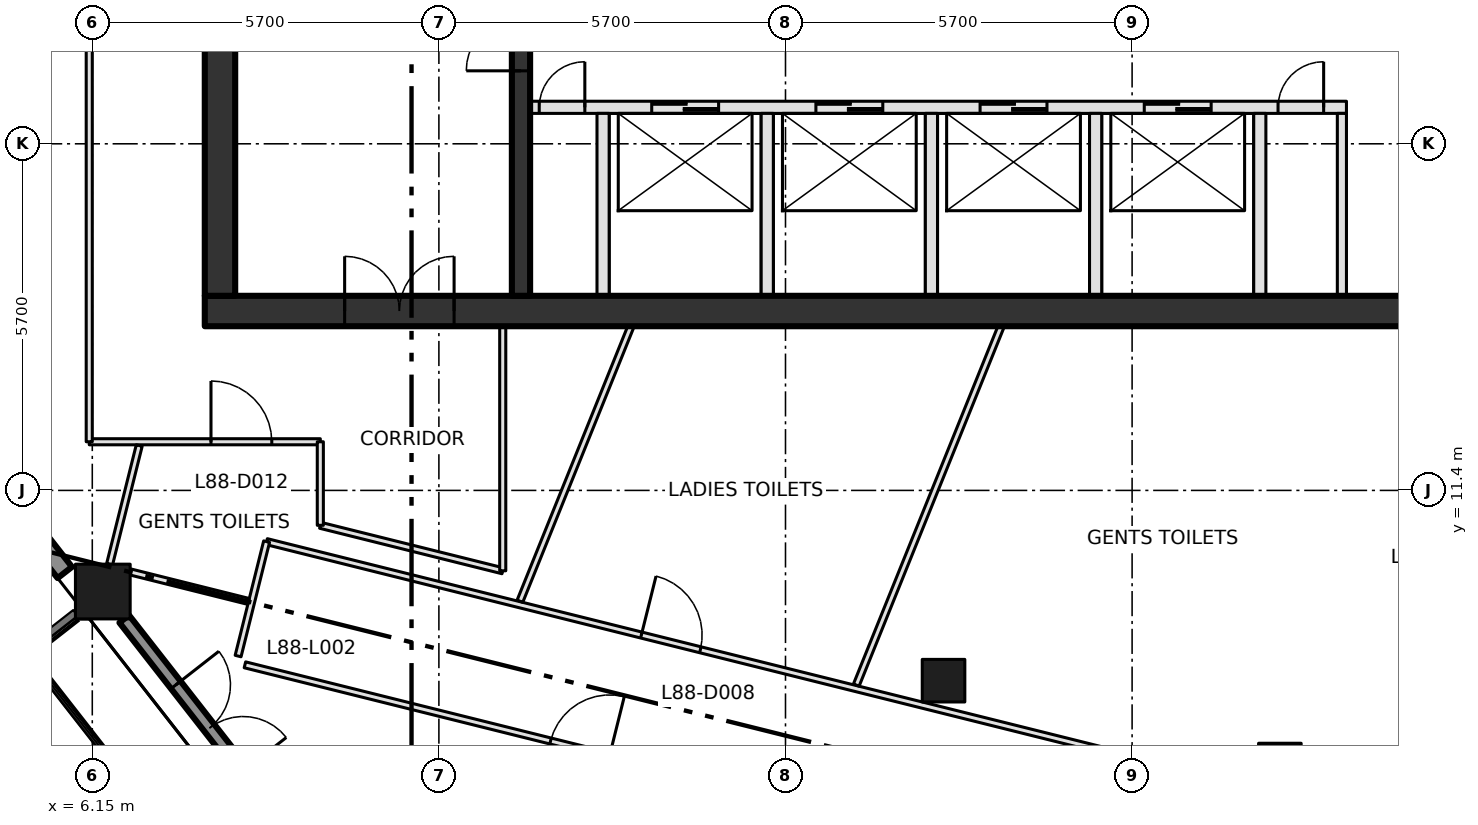
"""IFC4 building model, lengths in metres.
Left out: names, types, materials, properties, quantities, classifications, styles, units other than length and angle.
Written with IfcOpenShell. Run it as: python <this file> out.ifc"""

import sys

from ifc_helpers import new_model, si_unit, direction, frame, frame_2d, origin, origin_2d, place, context, subcontext, project, spatial, rectangle, extrude, element, fill, save


model = new_model("IFC4")
c1 = context("Model", 3, precision=1e-05, world=origin(), true_north=direction((0.0, 1.0)))
c2 = subcontext(c1, "Body", "Model", "MODEL_VIEW")
j1 = project(units=[si_unit("LENGTHUNIT", "METRE"), si_unit("PLANEANGLEUNIT", "RADIAN")], contexts=[c1])
p1 = place(None, origin())
s1 = spatial("IfcSite", under=j1, at=p1, CompositionType="ELEMENT")
p2 = place(p1, origin())
s2 = spatial("IfcBuilding", under=s1, at=p2, CompositionType="ELEMENT")
p3 = place(p2, frame((0.0, 0.0, 383.4)))
s3 = spatial("IfcBuildingStorey", under=s2, at=p3, CompositionType="ELEMENT", Elevation=383.4)
p4 = place(p3, frame((6.323, 9.737, 0.0), z_axis=(0.0, 0.0, 1.0), x_axis=(1.0, 0.0, 0.0)))
e1 = element("IfcColumn", 1, at=p4, inside=s3, PredefinedType="COLUMN", context=c2, shape_type="SweptSolid", body=[
    extrude(rectangle(XDim=0.9, YDim=0.9, at=origin_2d()), origin(), (0.0, 0.0, 1.0), 4.2),
])
for number, where, z_axis, x_axis in (
    (2, (20.149, 8.271, 0.0), (0.0, 0.0, 1.0), (1.0, 0.0, 0.0)),
    (3, (25.68, 6.892, 0.0), (0.0, 0.0, 1.0), (1.0, 0.0, 0.0)),
):
    element("IfcColumn", number, at=place(p3, frame(where, z_axis=z_axis, x_axis=x_axis)), inside=s3, PredefinedType="COLUMN", context=c2, shape_type="SweptSolid", body=[
        extrude(rectangle(XDim=0.7, YDim=0.7, at=origin_2d()), origin(), (0.0, 0.0, 1.0), 4.2),
    ])
p5 = place(p3, frame((8.0, 14.35, -0.3), z_axis=(0.0, 0.0, 1.0), x_axis=(1.0, 0.0, 0.0)))
e4 = element("IfcWall", 4, at=p5, inside=s3, PredefinedType="SHEAR", context=c2, shape_type="SweptSolid", body=[
    extrude(rectangle(XDim=22.8, YDim=0.5, at=frame_2d((11.4, 0.0))), origin(), (0.0, 0.0, 1.0), 4.2),
])
p6 = place(p5, frame((2.3, 0.0, 0.3)))
e5 = element("IfcOpeningElement", 5, at=p6, cuts=e4, PredefinedType="OPENING", context=c2, shape_type="SweptSolid", body=[
    extrude(rectangle(XDim=1.8, YDim=2.1, at=frame_2d((0.9, 1.05))), frame((0.0, 0.26, 0.0), z_axis=(0.0, -1.0, 0.0), x_axis=(1.0, 0.0, 0.0)), (0.0, 0.0, 1.0), 0.52),
])
p7 = place(p3, frame((8.25, 14.6, -0.3), z_axis=(0.0, 0.0, 1.0), x_axis=(0.0, 1.0, 0.0)))
e6 = element("IfcWall", 6, at=p7, inside=s3, PredefinedType="SHEAR", context=c2, shape_type="SweptSolid", body=[
    extrude(rectangle(XDim=21.1, YDim=0.5, at=frame_2d((10.55, 0.0))), origin(), (0.0, 0.0, 1.0), 4.2),
])
p8 = place(p3, frame((13.35, 17.7, 0.0), z_axis=(0.0, 0.0, 1.0), x_axis=(1.0, 0.0, 0.0)))
e7 = element("IfcWall", 7, at=p8, inside=s3, PredefinedType="SOLIDWALL", context=c2, shape_type="SweptSolid", body=[
    extrude(rectangle(XDim=13.425, YDim=0.2, at=frame_2d((6.712, 0.0))), origin(), (0.0, 0.0, 1.0), 3.9),
])
p9 = place(p8, frame((2.0, 0.0, 0.0)))
e8 = element("IfcOpeningElement", 8, at=p9, cuts=e7, PredefinedType="OPENING", context=c2, shape_type="SweptSolid", body=[
    extrude(rectangle(XDim=1.1, YDim=2.1, at=frame_2d((0.55, 1.05))), frame((0.0, 0.11, 0.0), z_axis=(0.0, -1.0, 0.0), x_axis=(1.0, 0.0, 0.0)), (0.0, 0.0, 1.0), 0.22),
])
p10 = place(p8, frame((4.7, 0.0, 0.0)))
e9 = element("IfcOpeningElement", 9, at=p10, cuts=e7, PredefinedType="OPENING", context=c2, shape_type="SweptSolid", body=[
    extrude(rectangle(XDim=1.1, YDim=2.1, at=frame_2d((0.55, 1.05))), frame((0.0, 0.11, 0.0), z_axis=(0.0, -1.0, 0.0), x_axis=(1.0, 0.0, 0.0)), (0.0, 0.0, 1.0), 0.22),
])
p11 = place(p8, frame((7.4, 0.0, 0.0)))
e10 = element("IfcOpeningElement", 10, at=p11, cuts=e7, PredefinedType="OPENING", context=c2, shape_type="SweptSolid", body=[
    extrude(rectangle(XDim=1.1, YDim=2.1, at=frame_2d((0.55, 1.05))), frame((0.0, 0.11, 0.0), z_axis=(0.0, -1.0, 0.0), x_axis=(1.0, 0.0, 0.0)), (0.0, 0.0, 1.0), 0.22),
])
p12 = place(p8, frame((10.1, 0.0, 0.0)))
e11 = element("IfcOpeningElement", 11, at=p12, cuts=e7, PredefinedType="OPENING", context=c2, shape_type="SweptSolid", body=[
    extrude(rectangle(XDim=1.1, YDim=2.1, at=frame_2d((0.55, 1.05))), frame((0.0, 0.11, 0.0), z_axis=(0.0, -1.0, 0.0), x_axis=(1.0, 0.0, 0.0)), (0.0, 0.0, 1.0), 0.22),
])
p13 = place(p8, frame((0.15, 0.0, 0.0)))
e12 = element("IfcOpeningElement", 12, at=p13, cuts=e7, PredefinedType="OPENING", context=c2, shape_type="SweptSolid", body=[
    extrude(rectangle(XDim=0.75, YDim=2.1, at=frame_2d((0.375, 1.05))), frame((0.0, 0.11, 0.0), z_axis=(0.0, -1.0, 0.0), x_axis=(1.0, 0.0, 0.0)), (0.0, 0.0, 1.0), 0.22),
])
p14 = place(p8, frame((12.3, 0.0, 0.0)))
e13 = element("IfcOpeningElement", 13, at=p14, cuts=e7, PredefinedType="OPENING", context=c2, shape_type="SweptSolid", body=[
    extrude(rectangle(XDim=0.75, YDim=2.1, at=frame_2d((0.375, 1.05))), frame((0.0, 0.11, 0.0), z_axis=(0.0, -1.0, 0.0), x_axis=(1.0, 0.0, 0.0)), (0.0, 0.0, 1.0), 0.22),
])
p15 = place(p3, frame((13.2, 14.6, 0.0), z_axis=(0.0, 0.0, 1.0), x_axis=(0.0, 1.0, 0.0)))
e14 = element("IfcWall", 14, at=p15, inside=s3, PredefinedType="SHEAR", context=c2, shape_type="SweptSolid", body=[
    extrude(rectangle(XDim=21.1, YDim=0.3, at=frame_2d((10.55, 0.0))), origin(), (0.0, 0.0, 1.0), 3.9),
])
p16 = place(p15, frame((3.7, 0.0, 0.0)))
e15 = element("IfcOpeningElement", 15, at=p16, cuts=e14, PredefinedType="OPENING", context=c2, shape_type="SweptSolid", body=[
    extrude(rectangle(XDim=1.8, YDim=2.1, at=frame_2d((0.9, 1.05))), frame((0.0, 0.16, 0.0), z_axis=(0.0, -1.0, 0.0), x_axis=(1.0, 0.0, 0.0)), (0.0, 0.0, 1.0), 0.32),
])
p17 = place(p15, frame((11.8, 0.0, 0.0)))
e16 = element("IfcOpeningElement", 16, at=p17, cuts=e14, PredefinedType="OPENING", context=c2, shape_type="SweptSolid", body=[
    extrude(rectangle(XDim=1.2, YDim=2.1, at=frame_2d((0.6, 1.05))), frame((0.0, 0.16, 0.0), z_axis=(0.0, -1.0, 0.0), x_axis=(1.0, 0.0, 0.0)), (0.0, 0.0, 1.0), 0.32),
])
for number, where, z_axis, x_axis in (
    (17, (14.55, 14.6, 0.0), (0.0, 0.0, 1.0), (0.0, 1.0, 0.0)),
    (18, (17.25, 14.6, 0.0), (0.0, 0.0, 1.0), (0.0, 1.0, 0.0)),
    (19, (19.95, 14.6, 0.0), (0.0, 0.0, 1.0), (0.0, 1.0, 0.0)),
    (20, (22.65, 14.6, 0.0), (0.0, 0.0, 1.0), (0.0, 1.0, 0.0)),
    (21, (25.35, 14.6, 0.0), (0.0, 0.0, 1.0), (0.0, 1.0, 0.0)),
):
    element("IfcWall", number, at=place(p3, frame(where, z_axis=z_axis, x_axis=x_axis)), inside=s3, PredefinedType="SOLIDWALL", context=c2, shape_type="SweptSolid", body=[
        extrude(rectangle(XDim=3.0, YDim=0.2, at=frame_2d((1.5, 0.0))), origin(), (0.0, 0.0, 1.0), 3.9),
    ])
p18 = place(p3, frame((26.7, 14.6, 0.0), z_axis=(0.0, 0.0, 1.0), x_axis=(0.0, 1.0, 0.0)))
e22 = element("IfcWall", 22, at=p18, inside=s3, PredefinedType="PARTITIONING", context=c2, shape_type="SweptSolid", body=[
    extrude(rectangle(XDim=3.0, YDim=0.15, at=frame_2d((1.5, 0.0))), origin(), (0.0, 0.0, 1.0), 3.9),
])
p19 = place(p3, frame((2.967, 13.547, 0.0), z_axis=(0.0, 0.0, 1.0), x_axis=(0.615486001463, -0.788147817356, 0.0)))
e23 = element("IfcWall", 23, at=p19, inside=s3, PredefinedType="SOLIDWALL", context=c2, shape_type="SweptSolid", body=[
    extrude(rectangle(XDim=4.437, YDim=0.3, at=frame_2d((2.219, 0.0))), origin(), (0.0, 0.0, 1.0), 3.2),
])
p20 = place(p19, frame((1.018, 0.0, 0.8)))
e24 = element("IfcOpeningElement", 24, at=p20, cuts=e23, PredefinedType="OPENING", context=c2, shape_type="SweptSolid", body=[
    extrude(rectangle(XDim=2.4, YDim=2.1, at=frame_2d((1.2, 1.05))), frame((0.0, 0.16, 0.0), z_axis=(0.0, -1.0, 0.0), x_axis=(1.0, 0.0, 0.0)), (0.0, 0.0, 1.0), 0.32),
])
p21 = place(p3, frame((6.675, 9.287, 0.0), z_axis=(0.0, 0.0, 1.0), x_axis=(0.615593109271, -0.788064162247, 0.0)))
e25 = element("IfcWall", 25, at=p21, inside=s3, PredefinedType="SOLIDWALL", context=c2, shape_type="SweptSolid", body=[
    extrude(rectangle(XDim=4.558, YDim=0.2, at=frame_2d((2.279, 0.0))), origin(), (0.0, 0.0, 1.0), 3.2),
])
p22 = place(p21, frame((1.378, 0.0, 0.0)))
e26 = element("IfcOpeningElement", 26, at=p22, cuts=e25, PredefinedType="OPENING", context=c2, shape_type="SweptSolid", body=[
    extrude(rectangle(XDim=1.8, YDim=2.9, at=frame_2d((0.9, 1.45))), frame((0.0, 0.11, 0.0), z_axis=(0.0, -1.0, 0.0), x_axis=(1.0, 0.0, 0.0)), (0.0, 0.0, 1.0), 0.22),
])
p23 = place(p3, frame((6.1, 12.2, 0.0), z_axis=(0.0, 0.0, 1.0), x_axis=(1.0, 0.0, 0.0)))
e27 = element("IfcWall", 27, at=p23, inside=s3, PredefinedType="PARTITIONING", context=c2, shape_type="SweptSolid", body=[
    extrude(rectangle(XDim=3.8, YDim=0.1, at=frame_2d((1.9, 0.0))), origin(), (0.0, 0.0, 1.0), 3.9),
])
p24 = place(p23, frame((2.002, 0.0, 0.0)))
e28 = element("IfcOpeningElement", 28, at=p24, cuts=e27, PredefinedType="OPENING", context=c2, shape_type="SweptSolid", body=[
    extrude(rectangle(XDim=1.0, YDim=2.1, at=frame_2d((0.5, 1.05))), frame((0.0, 0.06, 0.0), z_axis=(0.0, -1.0, 0.0), x_axis=(1.0, 0.0, 0.0)), (0.0, 0.0, 1.0), 0.12),
])
p25 = place(p3, frame((6.1, 29.287, 0.0), z_axis=(0.0, 0.0, 1.0), x_axis=(0.0, -1.0, 0.0)))
e29 = element("IfcWall", 29, at=p25, inside=s3, PredefinedType="PARTITIONING", context=c2, shape_type="SweptSolid", body=[
    extrude(rectangle(XDim=17.087, YDim=0.1, at=frame_2d((8.543, 0.0))), origin(), (0.0, 0.0, 1.0), 3.9),
])
p26 = place(p25, frame((7.98, 0.0, 0.0)))
e30 = element("IfcOpeningElement", 30, at=p26, cuts=e29, PredefinedType="OPENING", context=c2, shape_type="SweptSolid", body=[
    extrude(rectangle(XDim=1.8, YDim=2.1, at=frame_2d((0.9, 1.05))), frame((0.0, 0.06, 0.0), z_axis=(0.0, -1.0, 0.0), x_axis=(1.0, 0.0, 0.0)), (0.0, 0.0, 1.0), 0.12),
])
p27 = place(p3, frame((8.66, 8.532, 0.0), z_axis=(0.0, 0.0, 1.0), x_axis=(0.970305360263, -0.241883252509, 0.0)))
e31 = element("IfcWall", 31, at=p27, inside=s3, PredefinedType="PARTITIONING", context=c2, shape_type="SweptSolid", body=[
    extrude(rectangle(XDim=28.356, YDim=0.1, at=frame_2d((14.178, 0.0))), origin(), (0.0, 0.0, 1.0), 3.9),
])
p28 = place(p27, frame((18.321, 0.0, 0.0)))
e32 = element("IfcOpeningElement", 32, at=p28, cuts=e31, PredefinedType="OPENING", context=c2, shape_type="SweptSolid", body=[
    extrude(rectangle(XDim=1.8, YDim=2.1, at=frame_2d((0.9, 1.05))), frame((0.0, 0.06, 0.0), z_axis=(0.0, -1.0, 0.0), x_axis=(1.0, 0.0, 0.0)), (0.0, 0.0, 1.0), 0.12),
])
p29 = place(p27, frame((25.22, 0.0, 0.0)))
e33 = element("IfcOpeningElement", 33, at=p29, cuts=e31, PredefinedType="OPENING", context=c2, shape_type="SweptSolid", body=[
    extrude(rectangle(XDim=1.0, YDim=2.1, at=frame_2d((0.5, 1.05))), frame((0.0, 0.06, 0.0), z_axis=(0.0, -1.0, 0.0), x_axis=(1.0, 0.0, 0.0)), (0.0, 0.0, 1.0), 0.12),
])
p30 = place(p27, frame((5.18, 0.0, 0.0)))
e34 = element("IfcOpeningElement", 34, at=p30, cuts=e31, PredefinedType="OPENING", context=c2, shape_type="SweptSolid", body=[
    extrude(rectangle(XDim=1.0, YDim=2.1, at=frame_2d((0.5, 1.05))), frame((0.0, 0.06, 0.0), z_axis=(0.0, -1.0, 0.0), x_axis=(1.0, 0.0, 0.0)), (0.0, 0.0, 1.0), 0.12),
])
p31 = place(p3, frame((9.017, 10.558, 0.0), z_axis=(0.0, 0.0, 1.0), x_axis=(0.970286089829, -0.241960542, 0.0)))
e35 = element("IfcWall", 35, at=p31, inside=s3, PredefinedType="PARTITIONING", context=c2, shape_type="SweptSolid", body=[
    extrude(rectangle(XDim=19.879, YDim=0.1, at=frame_2d((9.94, 0.0))), origin(), (0.0, 0.0, 1.0), 3.9),
])
p32 = place(p31, frame((6.351, 0.0, 0.0)))
e36 = element("IfcOpeningElement", 36, at=p32, cuts=e35, PredefinedType="OPENING", context=c2, shape_type="SweptSolid", body=[
    extrude(rectangle(XDim=1.0, YDim=2.1, at=frame_2d((0.5, 1.05))), frame((0.0, 0.06, 0.0), z_axis=(0.0, -1.0, 0.0), x_axis=(1.0, 0.0, 0.0)), (0.0, 0.0, 1.0), 0.12),
])
p33 = place(p3, frame((9.017, 10.558, 0.0), z_axis=(0.0, 0.0, 1.0), x_axis=(-0.241795146079, -0.970327319688, 0.0)))
e37 = element("IfcWall", 37, at=p33, inside=s3, PredefinedType="PARTITIONING", context=c2, shape_type="SweptSolid", body=[
    extrude(rectangle(XDim=1.94, YDim=0.1, at=frame_2d((0.97, 0.0))), origin(), (0.0, 0.0, 1.0), 3.9),
])
p34 = place(p3, frame((9.9, 10.826, 0.0), z_axis=(0.0, 0.0, 1.0), x_axis=(0.970290953223, -0.241941038466, 0.0)))
e38 = element("IfcWall", 38, at=p34, inside=s3, PredefinedType="PARTITIONING", context=c2, shape_type="SweptSolid", body=[
    extrude(rectangle(XDim=3.092, YDim=0.1, at=frame_2d((1.546, 0.0))), origin(), (0.0, 0.0, 1.0), 3.9),
])
p35 = place(p3, frame((9.9, 12.2, 0.0), z_axis=(0.0, 0.0, 1.0), x_axis=(0.0, -1.0, 0.0)))
e39 = element("IfcWall", 39, at=p35, inside=s3, PredefinedType="PARTITIONING", context=c2, shape_type="SweptSolid", body=[
    extrude(rectangle(XDim=1.374, YDim=0.1, at=frame_2d((0.687, 0.0))), origin(), (0.0, 0.0, 1.0), 3.9),
])
p36 = place(p3, frame((12.9, 10.078, 0.0), z_axis=(0.0, 0.0, 1.0), x_axis=(0.0, 1.0, 0.0)))
e40 = element("IfcWall", 40, at=p36, inside=s3, PredefinedType="PARTITIONING", context=c2, shape_type="SweptSolid", body=[
    extrude(rectangle(XDim=4.022, YDim=0.1, at=frame_2d((2.011, 0.0))), origin(), (0.0, 0.0, 1.0), 3.9),
])
p37 = place(p3, frame((6.922, 12.138, 0.0), z_axis=(0.0, 0.0, 1.0), x_axis=(-0.24222136375, -0.97022101139, 0.0)))
e41 = element("IfcWall", 41, at=p37, inside=s3, PredefinedType="PARTITIONING", context=c2, shape_type="SweptSolid", body=[
    extrude(rectangle(XDim=2.011, YDim=0.1, at=frame_2d((1.005, 0.0))), origin(), (0.0, 0.0, 1.0), 3.9),
])
p38 = place(p3, frame((8.72, 9.574, 0.0), z_axis=(0.0, 0.0, 1.0), x_axis=(-0.970221168815, 0.24222073318, 0.0)))
e42 = element("IfcWall", 42, at=p38, inside=s3, PredefinedType="PARTITIONING", context=c2, shape_type="SweptSolid", body=[
    extrude(rectangle(XDim=2.007, YDim=0.1, at=frame_2d((1.003, 0.0))), origin(), (0.0, 0.0, 1.0), 3.9),
])
p39 = place(p3, frame((13.183, 9.578, 0.0), z_axis=(0.0, 0.0, 1.0), x_axis=(0.374400970809, 0.927266904973, 0.0)))
e43 = element("IfcWall", 43, at=p39, inside=s3, PredefinedType="PARTITIONING", context=c2, shape_type="SweptSolid", body=[
    extrude(rectangle(XDim=4.877, YDim=0.1, at=frame_2d((2.438, 0.0))), origin(), (0.0, 0.0, 1.0), 3.9),
])
p40 = place(p3, frame((18.714, 8.199, 0.0), z_axis=(0.0, 0.0, 1.0), x_axis=(0.374418014388, 0.927260023133, 0.0)))
e44 = element("IfcWall", 44, at=p40, inside=s3, PredefinedType="PARTITIONING", context=c2, shape_type="SweptSolid", body=[
    extrude(rectangle(XDim=6.364, YDim=0.1, at=frame_2d((3.182, 0.0))), origin(), (0.0, 0.0, 1.0), 3.9),
])
p41 = place(p9, origin())
e45 = element("IfcDoor", 45, at=p41, inside=s3, OperationType="SLIDING_TO_LEFT", PredefinedType="DOOR", context=c2, shape_type="SweptSolid", body=[
    extrude(rectangle(XDim=1.1, YDim=2.1, at=frame_2d((0.55, 1.05))), frame((0.0, 0.025, 0.0), z_axis=(0.0, -1.0, 0.0), x_axis=(1.0, 0.0, 0.0)), (0.0, 0.0, 1.0), 0.05),
])
fill(e8, e45)
p42 = place(p10, origin())
e46 = element("IfcDoor", 46, at=p42, inside=s3, OperationType="SLIDING_TO_LEFT", PredefinedType="DOOR", context=c2, shape_type="SweptSolid", body=[
    extrude(rectangle(XDim=1.1, YDim=2.1, at=frame_2d((0.55, 1.05))), frame((0.0, 0.025, 0.0), z_axis=(0.0, -1.0, 0.0), x_axis=(1.0, 0.0, 0.0)), (0.0, 0.0, 1.0), 0.05),
])
fill(e9, e46)
p43 = place(p11, origin())
e47 = element("IfcDoor", 47, at=p43, inside=s3, OperationType="SLIDING_TO_LEFT", PredefinedType="DOOR", context=c2, shape_type="SweptSolid", body=[
    extrude(rectangle(XDim=1.1, YDim=2.1, at=frame_2d((0.55, 1.05))), frame((0.0, 0.025, 0.0), z_axis=(0.0, -1.0, 0.0), x_axis=(1.0, 0.0, 0.0)), (0.0, 0.0, 1.0), 0.05),
])
fill(e10, e47)
p44 = place(p12, origin())
e48 = element("IfcDoor", 48, at=p44, inside=s3, OperationType="SLIDING_TO_LEFT", PredefinedType="DOOR", context=c2, shape_type="SweptSolid", body=[
    extrude(rectangle(XDim=1.1, YDim=2.1, at=frame_2d((0.55, 1.05))), frame((0.0, 0.025, 0.0), z_axis=(0.0, -1.0, 0.0), x_axis=(1.0, 0.0, 0.0)), (0.0, 0.0, 1.0), 0.05),
])
fill(e11, e48)
p45 = place(p13, origin())
e49 = element("IfcDoor", 49, at=p45, inside=s3, OperationType="SINGLE_SWING_RIGHT", PredefinedType="DOOR", context=c2, shape_type="SweptSolid", body=[
    extrude(rectangle(XDim=0.75, YDim=2.1, at=frame_2d((0.375, 1.05))), frame((0.0, 0.025, 0.0), z_axis=(0.0, -1.0, 0.0), x_axis=(1.0, 0.0, 0.0)), (0.0, 0.0, 1.0), 0.05),
])
fill(e12, e49)
p46 = place(p14, origin())
e50 = element("IfcDoor", 50, at=p46, inside=s3, OperationType="SINGLE_SWING_RIGHT", PredefinedType="DOOR", context=c2, shape_type="SweptSolid", body=[
    extrude(rectangle(XDim=0.75, YDim=2.1, at=frame_2d((0.375, 1.05))), frame((0.0, 0.025, 0.0), z_axis=(0.0, -1.0, 0.0), x_axis=(1.0, 0.0, 0.0)), (0.0, 0.0, 1.0), 0.05),
])
fill(e13, e50)
p47 = place(p16, origin())
e51 = element("IfcDoor", 51, at=p47, inside=s3, OperationType="DOUBLE_DOOR_SINGLE_SWING", PredefinedType="DOOR", context=c2, shape_type="SweptSolid", body=[
    extrude(rectangle(XDim=1.8, YDim=2.1, at=frame_2d((0.9, 1.05))), frame((0.0, 0.025, 0.0), z_axis=(0.0, -1.0, 0.0), x_axis=(1.0, 0.0, 0.0)), (0.0, 0.0, 1.0), 0.05),
])
fill(e15, e51)
p48 = place(p6, origin())
e52 = element("IfcDoor", 52, at=p48, inside=s3, OperationType="DOUBLE_DOOR_SINGLE_SWING", PredefinedType="DOOR", context=c2, shape_type="SweptSolid", body=[
    extrude(rectangle(XDim=1.8, YDim=2.1, at=frame_2d((0.9, 1.05))), frame((0.0, 0.025, 0.0), z_axis=(0.0, -1.0, 0.0), x_axis=(1.0, 0.0, 0.0)), (0.0, 0.0, 1.0), 0.05),
])
fill(e5, e52)
p49 = place(p22, origin())
e53 = element("IfcDoor", 53, at=p49, inside=s3, OperationType="DOUBLE_DOOR_SINGLE_SWING", PredefinedType="DOOR", context=c2, shape_type="SweptSolid", body=[
    extrude(rectangle(XDim=1.8, YDim=2.9, at=frame_2d((0.9, 1.45))), frame((0.0, 0.025, 0.0), z_axis=(0.0, -1.0, 0.0), x_axis=(1.0, 0.0, 0.0)), (0.0, 0.0, 1.0), 0.05),
])
fill(e26, e53)
p50 = place(p30, origin())
e54 = element("IfcDoor", 54, at=p50, inside=s3, OperationType="SINGLE_SWING_RIGHT", PredefinedType="DOOR", context=c2, shape_type="SweptSolid", body=[
    extrude(rectangle(XDim=1.0, YDim=2.1, at=frame_2d((0.5, 1.05))), frame((0.0, 0.025, 0.0), z_axis=(0.0, -1.0, 0.0), x_axis=(1.0, 0.0, 0.0)), (0.0, 0.0, 1.0), 0.05),
])
fill(e34, e54)
p51 = place(p32, origin())
e55 = element("IfcDoor", 55, at=p51, inside=s3, OperationType="SINGLE_SWING_LEFT", PredefinedType="DOOR", context=c2, shape_type="SweptSolid", body=[
    extrude(rectangle(XDim=1.0, YDim=2.1, at=frame_2d((0.5, 1.05))), frame((0.0, 0.025, 0.0), z_axis=(0.0, -1.0, 0.0), x_axis=(1.0, 0.0, 0.0)), (0.0, 0.0, 1.0), 0.05),
])
fill(e36, e55)
p52 = place(p24, origin())
e56 = element("IfcDoor", 56, at=p52, inside=s3, OperationType="SINGLE_SWING_LEFT", PredefinedType="DOOR", context=c2, shape_type="SweptSolid", body=[
    extrude(rectangle(XDim=1.0, YDim=2.1, at=frame_2d((0.5, 1.05))), frame((0.0, 0.025, 0.0), z_axis=(0.0, -1.0, 0.0), x_axis=(1.0, 0.0, 0.0)), (0.0, 0.0, 1.0), 0.05),
])
fill(e28, e56)
save(model, sys.argv[1])
